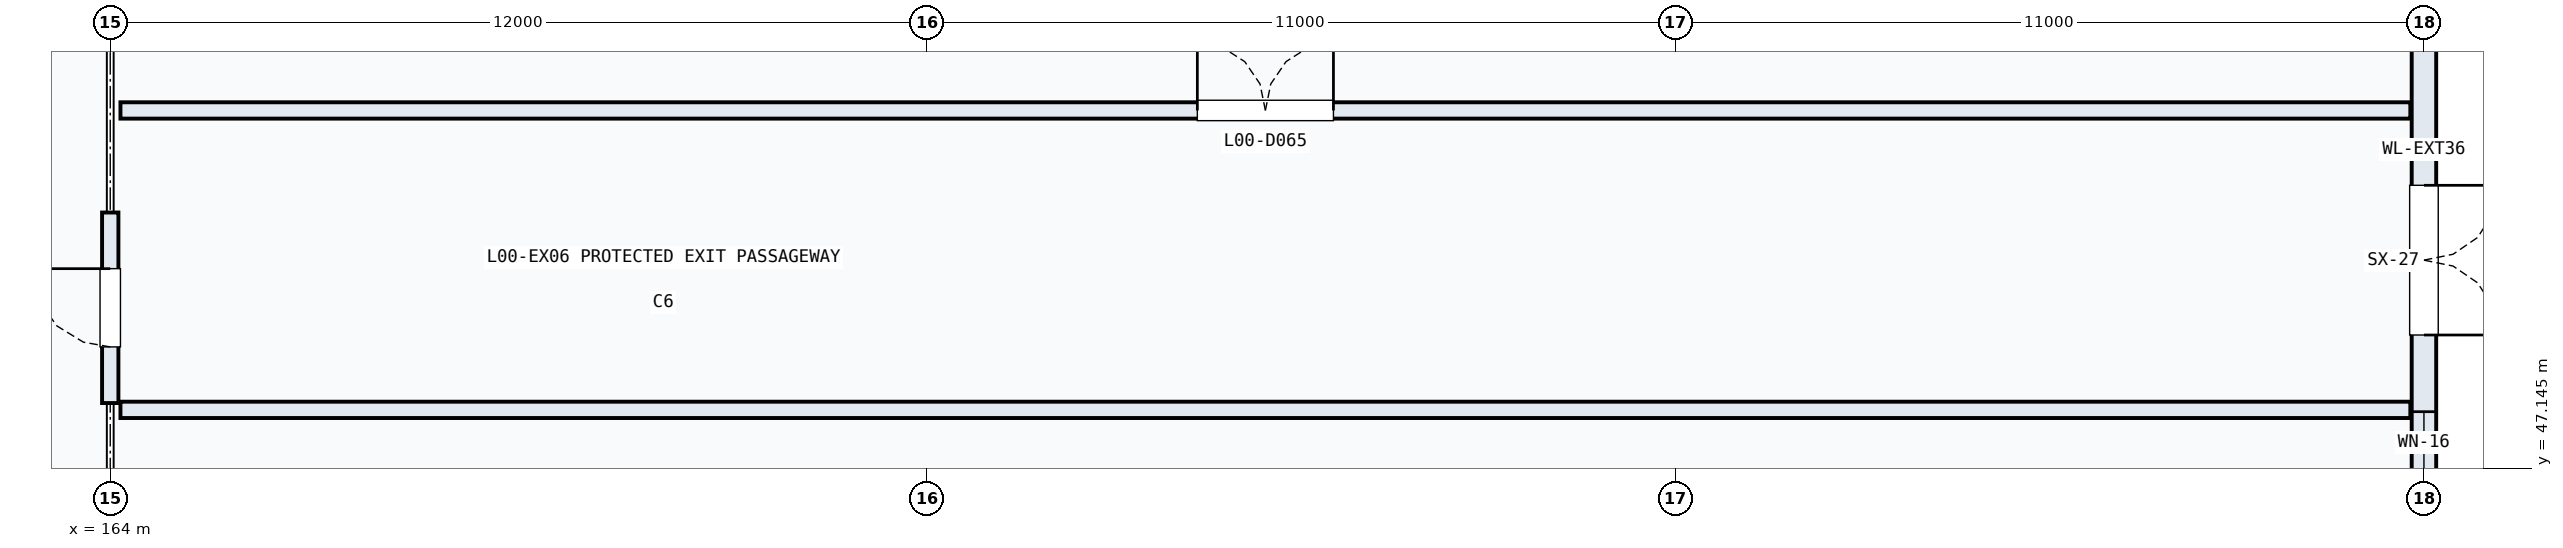
"""IFC4 building model, lengths in metres.
Left out: names, types, materials, properties, quantities, classifications, styles, units other than length and angle.
Written with IfcOpenShell. Run it as: python <this file> out.ifc"""

import sys

from ifc_helpers import new_model, si_unit, direction, frame, frame_2d, origin, place, context, subcontext, project, spatial, rectangle, extrude, element, fill, save


model = new_model("IFC4")
c1 = context("Model", 3, precision=1e-05, world=origin(), true_north=direction((0.0, 1.0)))
c2 = subcontext(c1, "Body", "Model", "MODEL_VIEW")
j1 = project(units=[si_unit("LENGTHUNIT", "METRE"), si_unit("PLANEANGLEUNIT", "RADIAN")], contexts=[c1])
p1 = place(None, origin())
s1 = spatial("IfcSite", under=j1, at=p1, CompositionType="ELEMENT")
p2 = place(p1, origin())
s2 = spatial("IfcBuilding", under=s1, at=p2, CompositionType="ELEMENT")
p3 = place(p2, origin())
s3 = spatial("IfcBuildingStorey", under=s2, at=p3, CompositionType="ELEMENT", Elevation=0.0)
p4 = place(p3, frame((198.0, 44.22, 0.0), z_axis=(0.0, 0.0, 1.0), x_axis=(0.0, 1.0, 0.0)))
e1 = element("IfcWall", 1, at=p4, inside=s3, PredefinedType="SOLIDWALL", context=c2, shape_type="SweptSolid", body=[
    extrude(rectangle(XDim=10.57, YDim=0.36, at=frame_2d((5.285, 0.0))), origin(), (0.0, 0.0, 1.0), 4.1),
])
p5 = place(p4, frame((4.88, 0.0, 0.0)))
e2 = element("IfcOpeningElement", 2, at=p5, cuts=e1, PredefinedType="OPENING", context=c2, shape_type="SweptSolid", body=[
    extrude(rectangle(XDim=2.2, YDim=2.35, at=frame_2d((1.1, 1.175))), frame((0.0, 0.19, 0.0), z_axis=(0.0, -1.0, 0.0), x_axis=(1.0, 0.0, 0.0)), (0.0, 0.0, 1.0), 0.38),
])
p6 = place(p4, frame((2.853, 0.0, 0.8)))
e3 = element("IfcOpeningElement", 3, at=p6, cuts=e1, PredefinedType="OPENING", context=c2, shape_type="SweptSolid", body=[
    extrude(rectangle(XDim=0.9, YDim=1.8, at=frame_2d((0.45, 0.9))), frame((0.0, 0.19, 0.0), z_axis=(0.0, -1.0, 0.0), x_axis=(1.0, 0.0, 0.0)), (0.0, 0.0, 1.0), 0.38),
])
p7 = place(p3, frame((164.15, 48.0, 0.0), z_axis=(0.0, 0.0, 1.0), x_axis=(1.0, 0.0, 0.0)))
e4 = element("IfcWall", 4, at=p7, inside=s3, PredefinedType="PARTITIONING", context=c2, shape_type="SweptSolid", body=[
    extrude(rectangle(XDim=33.65, YDim=0.24, at=frame_2d((16.825, 0.0))), origin(), (0.0, 0.0, 1.0), 4.25),
])
p8 = place(p3, frame((164.15, 52.4, 0.0), z_axis=(0.0, 0.0, 1.0), x_axis=(1.0, 0.0, 0.0)))
e5 = element("IfcWall", 5, at=p8, inside=s3, PredefinedType="PARTITIONING", context=c2, shape_type="SweptSolid", body=[
    extrude(rectangle(XDim=33.65, YDim=0.24, at=frame_2d((16.825, 0.0))), origin(), (0.0, 0.0, 1.0), 4.25),
])
p9 = place(p8, frame((15.825, 0.0, 0.0)))
e6 = element("IfcOpeningElement", 6, at=p9, cuts=e5, PredefinedType="OPENING", context=c2, shape_type="SweptSolid", body=[
    extrude(rectangle(XDim=2.0, YDim=2.25, at=frame_2d((1.0, 1.125))), frame((0.0, 0.13, 0.0), z_axis=(0.0, -1.0, 0.0), x_axis=(1.0, 0.0, 0.0)), (0.0, 0.0, 1.0), 0.26),
])
p10 = place(p3, frame((164.0, 48.1, 0.0), z_axis=(0.0, 0.0, 1.0), x_axis=(0.0, 1.0, 0.0)))
e7 = element("IfcWall", 7, at=p10, inside=s3, PredefinedType="PARTITIONING", context=c2, shape_type="SweptSolid", body=[
    extrude(rectangle(XDim=2.8, YDim=0.24, at=frame_2d((1.4, 0.0))), origin(), (0.0, 0.0, 1.0), 4.65),
])
p11 = place(p10, frame((0.825, 0.0, 0.0)))
e8 = element("IfcOpeningElement", 8, at=p11, cuts=e7, PredefinedType="OPENING", context=c2, shape_type="SweptSolid", body=[
    extrude(rectangle(XDim=1.15, YDim=2.2, at=frame_2d((0.575, 1.1))), frame((0.0, 0.13, 0.0), z_axis=(0.0, -1.0, 0.0), x_axis=(1.0, 0.0, 0.0)), (0.0, 0.0, 1.0), 0.26),
])
p12 = place(p5, frame((2.2, 0.0, 0.0), z_axis=(0.0, 0.0, 1.0), x_axis=(-1.0, 0.0, 0.0)))
e9 = element("IfcDoor", 9, at=p12, inside=s3, OperationType="DOUBLE_DOOR_SINGLE_SWING", PredefinedType="DOOR", context=c2, shape_type="SweptSolid", body=[
    extrude(rectangle(XDim=2.2, YDim=2.35, at=frame_2d((1.1, 1.175))), frame((0.0, 0.025, 0.0), z_axis=(0.0, -1.0, 0.0), x_axis=(1.0, 0.0, 0.0)), (0.0, 0.0, 1.0), 0.05),
])
fill(e2, e9)
p13 = place(p6, origin())
e10 = element("IfcWindow", 10, at=p13, inside=s3, PartitioningType="SINGLE_PANEL", PredefinedType="WINDOW", context=c2, shape_type="SweptSolid", body=[
    extrude(rectangle(XDim=0.9, YDim=1.8, at=frame_2d((0.45, 0.9))), frame((0.0, 0.03, 0.0), z_axis=(0.0, -1.0, 0.0), x_axis=(1.0, 0.0, 0.0)), (0.0, 0.0, 1.0), 0.06),
])
fill(e3, e10)
p14 = place(p9, origin())
e11 = element("IfcDoor", 11, at=p14, inside=s3, OperationType="DOUBLE_DOOR_SINGLE_SWING", PredefinedType="DOOR", context=c2, shape_type="SweptSolid", body=[
    extrude(rectangle(XDim=2.0, YDim=2.25, at=frame_2d((1.0, 1.125))), frame((0.0, 0.025, 0.0), z_axis=(0.0, -1.0, 0.0), x_axis=(1.0, 0.0, 0.0)), (0.0, 0.0, 1.0), 0.05),
])
fill(e6, e11)
p15 = place(p11, origin())
e12 = element("IfcDoor", 12, at=p15, inside=s3, OperationType="SINGLE_SWING_RIGHT", PredefinedType="DOOR", context=c2, shape_type="SweptSolid", body=[
    extrude(rectangle(XDim=1.15, YDim=2.2, at=frame_2d((0.575, 1.1))), frame((0.0, 0.025, 0.0), z_axis=(0.0, -1.0, 0.0), x_axis=(1.0, 0.0, 0.0)), (0.0, 0.0, 1.0), 0.05),
])
fill(e8, e12)
save(model, sys.argv[1])
